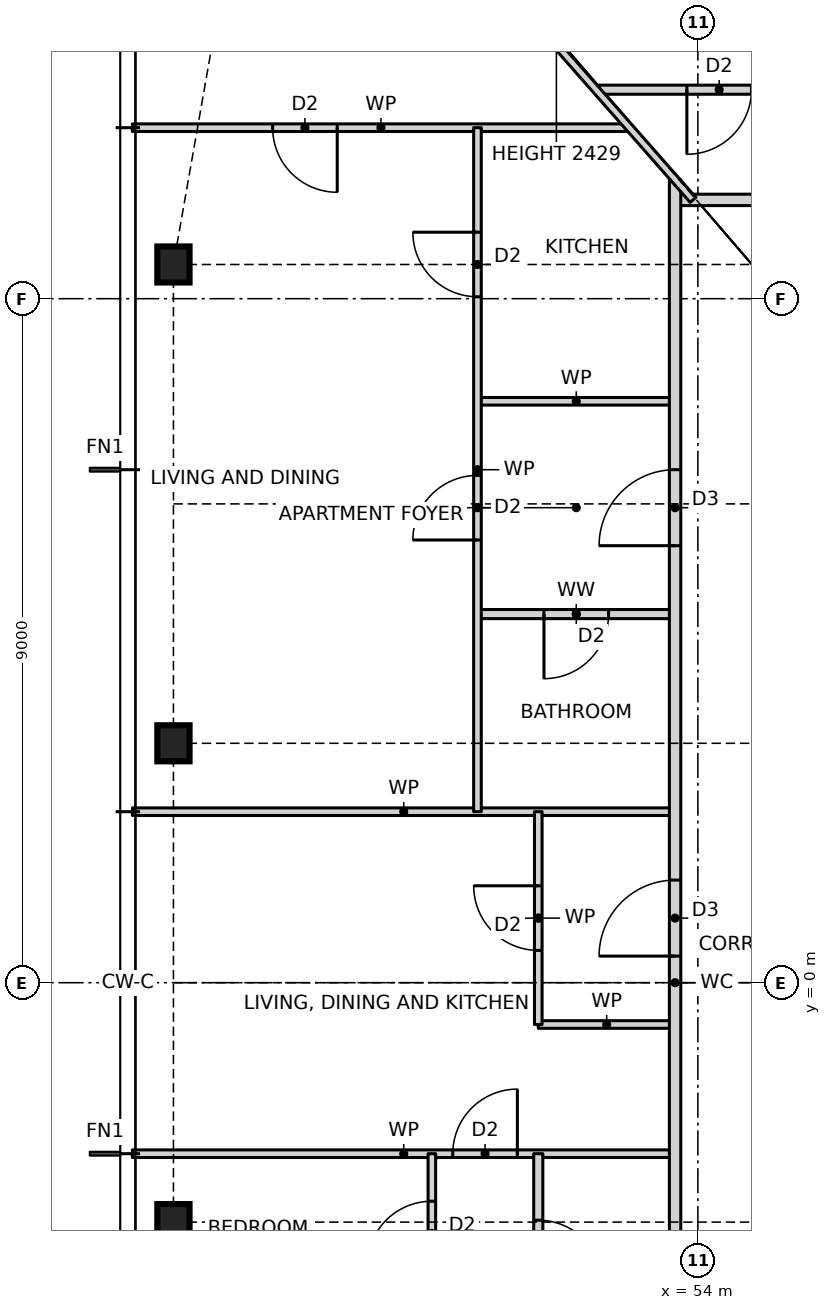
"""IFC4 building model, lengths in metres.
Left out: names, types, materials, properties, quantities, classifications, styles, units other than length and angle.
Written with IfcOpenShell. Run it as: python <this file> out.ifc"""

import sys

from ifc_helpers import new_model, si_unit, direction, frame, frame_2d, origin, origin_2d, place, context, subcontext, project, spatial, rectangle, i_section, extrude, element, fill, save


model = new_model("IFC4")
c1 = context("Model", 3, precision=1e-05, world=origin(), true_north=direction((0.0, 1.0)))
c2 = subcontext(c1, "Body", "Model", "MODEL_VIEW")
j1 = project(units=[si_unit("LENGTHUNIT", "METRE"), si_unit("PLANEANGLEUNIT", "RADIAN")], contexts=[c1])
p1 = place(None, origin())
s1 = spatial("IfcSite", under=j1, at=p1, CompositionType="ELEMENT")
p2 = place(p1, origin())
s2 = spatial("IfcBuilding", under=s1, at=p2, CompositionType="ELEMENT")
p3 = place(p2, frame((0.0, 0.0, 67.5)))
s3 = spatial("IfcBuildingStorey", under=s2, at=p3, CompositionType="ELEMENT", Elevation=67.5)
for number, where, z_axis, x_axis in (
    (1, (47.1, 9.45, 0.0), (0.0, 0.0, 1.0), (1.0, 0.0, 0.0)),
    (2, (47.1, 3.15, 0.0), (0.0, 0.0, 1.0), (1.0, 0.0, 0.0)),
    (3, (47.1, -3.15, 0.0), (0.0, 0.0, 1.0), (1.0, 0.0, 0.0)),
):
    element("IfcColumn", number, at=place(p3, frame(where, z_axis=z_axis, x_axis=x_axis)), inside=s3, PredefinedType="COLUMN", context=c2, shape_type="SweptSolid", body=[
        extrude(i_section(OverallWidth=0.424, OverallDepth=0.475, WebThickness=0.048, FlangeThickness=0.077, at=origin_2d()), origin(), (0.0, 0.0, 1.0), 3.5),
    ])
p4 = place(p3, frame((46.56, -2.25, 0.0), z_axis=(0.0, 0.0, 1.0), x_axis=(1.0, 0.0, 0.0)))
e4 = element("IfcWall", 4, at=p4, inside=s3, PredefinedType="PARTITIONING", context=c2, shape_type="SweptSolid", body=[
    extrude(rectangle(XDim=7.14, YDim=0.1, at=frame_2d((3.57, 0.0))), origin(), (0.0, 0.0, 1.0), 3.27),
])
p5 = place(p4, frame((4.215, 0.0, 0.0)))
e5 = element("IfcOpeningElement", 5, at=p5, cuts=e4, PredefinedType="OPENING", context=c2, shape_type="SweptSolid", body=[
    extrude(rectangle(XDim=0.85, YDim=2.1, at=frame_2d((0.425, 1.05))), frame((0.0, 0.06, 0.0), z_axis=(0.0, -1.0, 0.0), x_axis=(1.0, 0.0, 0.0)), (0.0, 0.0, 1.0), 0.12),
])
p6 = place(p3, frame((51.9, -0.55, 0.0), z_axis=(0.0, 0.0, 1.0), x_axis=(1.0, 0.0, 0.0)))
e6 = element("IfcWall", 6, at=p6, inside=s3, PredefinedType="PARTITIONING", context=c2, shape_type="SweptSolid", body=[
    extrude(rectangle(XDim=1.8, YDim=0.1, at=frame_2d((0.9, 0.0))), origin(), (0.0, 0.0, 1.0), 3.27),
])
p7 = place(p3, frame((46.56, 2.25, 0.0), z_axis=(0.0, 0.0, 1.0), x_axis=(1.0, 0.0, 0.0)))
e7 = element("IfcWall", 7, at=p7, inside=s3, PredefinedType="PARTITIONING", context=c2, shape_type="SweptSolid", body=[
    extrude(rectangle(XDim=7.14, YDim=0.1, at=frame_2d((3.57, 0.0))), origin(), (0.0, 0.0, 1.0), 3.27),
])
p8 = place(p3, frame((51.1, 4.85, 0.0), z_axis=(0.0, 0.0, 1.0), x_axis=(1.0, 0.0, 0.0)))
e8 = element("IfcWall", 8, at=p8, inside=s3, PredefinedType="PARTITIONING", context=c2, shape_type="SweptSolid", body=[
    extrude(rectangle(XDim=2.6, YDim=0.12, at=frame_2d((1.3, 0.0))), origin(), (0.0, 0.0, 1.0), 3.27),
])
p9 = place(p8, frame((0.875, 0.0, 0.0)))
e9 = element("IfcOpeningElement", 9, at=p9, cuts=e8, PredefinedType="OPENING", context=c2, shape_type="SweptSolid", body=[
    extrude(rectangle(XDim=0.85, YDim=2.1, at=frame_2d((0.425, 1.05))), frame((0.0, 0.07, 0.0), z_axis=(0.0, -1.0, 0.0), x_axis=(1.0, 0.0, 0.0)), (0.0, 0.0, 1.0), 0.14),
])
p10 = place(p3, frame((51.1, 7.65, 0.0), z_axis=(0.0, 0.0, 1.0), x_axis=(1.0, 0.0, 0.0)))
e10 = element("IfcWall", 10, at=p10, inside=s3, PredefinedType="PARTITIONING", context=c2, shape_type="SweptSolid", body=[
    extrude(rectangle(XDim=2.6, YDim=0.1, at=frame_2d((1.3, 0.0))), origin(), (0.0, 0.0, 1.0), 3.27),
])
p11 = place(p3, frame((53.7, 10.3, 0.0), z_axis=(0.0, 0.0, 1.0), x_axis=(1.0, 0.0, 0.0)))
e11 = element("IfcWall", 11, at=p11, inside=s3, PredefinedType="PARTITIONING", context=c2, shape_type="SweptSolid", body=[
    extrude(rectangle(XDim=18.6, YDim=0.15, at=frame_2d((9.3, 0.0))), origin(), (0.0, 0.0, 1.0), 3.27),
])
p12 = place(p11, frame((12.8, 0.0, 0.0)))
e12 = element("IfcOpeningElement", 12, at=p12, cuts=e11, PredefinedType="OPENING", context=c2, shape_type="SweptSolid", body=[
    extrude(rectangle(XDim=1.0, YDim=2.1, at=frame_2d((0.5, 1.05))), frame((0.0, 0.085, 0.0), z_axis=(0.0, -1.0, 0.0), x_axis=(1.0, 0.0, 0.0)), (0.0, 0.0, 1.0), 0.17),
])
p13 = place(p11, frame((7.4, 0.0, 0.0)))
e13 = element("IfcOpeningElement", 13, at=p13, cuts=e11, PredefinedType="OPENING", context=c2, shape_type="SweptSolid", body=[
    extrude(rectangle(XDim=1.0, YDim=2.1, at=frame_2d((0.5, 1.05))), frame((0.0, 0.085, 0.0), z_axis=(0.0, -1.0, 0.0), x_axis=(1.0, 0.0, 0.0)), (0.0, 0.0, 1.0), 0.17),
])
p14 = place(p3, frame((46.56, 11.25, 0.0), z_axis=(0.0, 0.0, 1.0), x_axis=(1.0, 0.0, 0.0)))
e14 = element("IfcWall", 14, at=p14, inside=s3, PredefinedType="PARTITIONING", context=c2, shape_type="SweptSolid", body=[
    extrude(rectangle(XDim=6.54, YDim=0.1, at=frame_2d((3.27, 0.0))), origin(), (0.0, 0.0, 1.0), 3.27),
])
p15 = place(p14, frame((1.845, 0.0, 0.0)))
e15 = element("IfcOpeningElement", 15, at=p15, cuts=e14, PredefinedType="OPENING", context=c2, shape_type="SweptSolid", body=[
    extrude(rectangle(XDim=0.85, YDim=2.1, at=frame_2d((0.425, 1.05))), frame((0.0, 0.06, 0.0), z_axis=(0.0, -1.0, 0.0), x_axis=(1.0, 0.0, 0.0)), (0.0, 0.0, 1.0), 0.12),
])
p16 = place(p3, frame((52.66, 11.75, 0.0), z_axis=(0.0, 0.0, 1.0), x_axis=(1.0, 0.0, 0.0)))
e16 = element("IfcWall", 16, at=p16, inside=s3, PredefinedType="PARTITIONING", context=c2, shape_type="SweptSolid", body=[
    extrude(rectangle(XDim=5.84, YDim=0.12, at=frame_2d((2.92, 0.0))), origin(), (0.0, 0.0, 1.0), 3.27),
])
p17 = place(p16, frame((4.115, 0.0, 0.0)))
e17 = element("IfcOpeningElement", 17, at=p17, cuts=e16, PredefinedType="OPENING", context=c2, shape_type="SweptSolid", body=[
    extrude(rectangle(XDim=0.85, YDim=2.1, at=frame_2d((0.425, 1.05))), frame((0.0, 0.07, 0.0), z_axis=(0.0, -1.0, 0.0), x_axis=(1.0, 0.0, 0.0)), (0.0, 0.0, 1.0), 0.14),
])
p18 = place(p16, frame((1.195, 0.0, 0.0)))
e18 = element("IfcOpeningElement", 18, at=p18, cuts=e16, PredefinedType="OPENING", context=c2, shape_type="SweptSolid", body=[
    extrude(rectangle(XDim=0.85, YDim=2.1, at=frame_2d((0.425, 1.05))), frame((0.0, 0.07, 0.0), z_axis=(0.0, -1.0, 0.0), x_axis=(1.0, 0.0, 0.0)), (0.0, 0.0, 1.0), 0.14),
])
p19 = place(p3, frame((53.7, -10.568, 0.0), z_axis=(0.0, 0.0, 1.0), x_axis=(0.0, 1.0, 0.0)))
e19 = element("IfcWall", 19, at=p19, inside=s3, PredefinedType="PARTITIONING", context=c2, shape_type="SweptSolid", body=[
    extrude(rectangle(XDim=21.136, YDim=0.15, at=frame_2d((10.568, 0.0))), origin(), (0.0, 0.0, 1.0), 3.27),
])
p20 = place(p19, frame((16.318, 0.0, 0.0)))
e20 = element("IfcOpeningElement", 20, at=p20, cuts=e19, PredefinedType="OPENING", context=c2, shape_type="SweptSolid", body=[
    extrude(rectangle(XDim=1.0, YDim=2.1, at=frame_2d((0.5, 1.05))), frame((0.0, 0.085, 0.0), z_axis=(0.0, -1.0, 0.0), x_axis=(1.0, 0.0, 0.0)), (0.0, 0.0, 1.0), 0.17),
])
p21 = place(p19, frame((10.918, 0.0, 0.0)))
e21 = element("IfcOpeningElement", 21, at=p21, cuts=e19, PredefinedType="OPENING", context=c2, shape_type="SweptSolid", body=[
    extrude(rectangle(XDim=1.0, YDim=2.1, at=frame_2d((0.5, 1.05))), frame((0.0, 0.085, 0.0), z_axis=(0.0, -1.0, 0.0), x_axis=(1.0, 0.0, 0.0)), (0.0, 0.0, 1.0), 0.17),
])
p22 = place(p3, frame((51.9, -12.614, 0.0), z_axis=(0.0, 0.0, 1.0), x_axis=(0.0, 1.0, 0.0)))
e22 = element("IfcWall", 22, at=p22, inside=s3, PredefinedType="PARTITIONING", context=c2, shape_type="SweptSolid", body=[
    extrude(rectangle(XDim=10.364, YDim=0.12, at=frame_2d((5.182, 0.0))), origin(), (0.0, 0.0, 1.0), 3.27),
])
p23 = place(p22, frame((8.639, 0.0, 0.0)))
e23 = element("IfcOpeningElement", 23, at=p23, cuts=e22, PredefinedType="OPENING", context=c2, shape_type="SweptSolid", body=[
    extrude(rectangle(XDim=0.85, YDim=2.1, at=frame_2d((0.425, 1.05))), frame((0.0, 0.07, 0.0), z_axis=(0.0, -1.0, 0.0), x_axis=(1.0, 0.0, 0.0)), (0.0, 0.0, 1.0), 0.14),
])
p24 = place(p22, frame((5.139, 0.0, 0.0)))
e24 = element("IfcOpeningElement", 24, at=p24, cuts=e22, PredefinedType="OPENING", context=c2, shape_type="SweptSolid", body=[
    extrude(rectangle(XDim=0.85, YDim=2.1, at=frame_2d((0.425, 1.05))), frame((0.0, 0.07, 0.0), z_axis=(0.0, -1.0, 0.0), x_axis=(1.0, 0.0, 0.0)), (0.0, 0.0, 1.0), 0.14),
])
p25 = place(p22, frame((1.257, 0.0, 0.0)))
e25 = element("IfcOpeningElement", 25, at=p25, cuts=e22, PredefinedType="OPENING", context=c2, shape_type="SweptSolid", body=[
    extrude(rectangle(XDim=0.85, YDim=2.1, at=frame_2d((0.425, 1.05))), frame((0.0, 0.07, 0.0), z_axis=(0.0, -1.0, 0.0), x_axis=(1.0, 0.0, 0.0)), (0.0, 0.0, 1.0), 0.14),
])
p26 = place(p3, frame((51.9, -0.55, 0.0), z_axis=(0.0, 0.0, 1.0), x_axis=(0.0, 1.0, 0.0)))
e26 = element("IfcWall", 26, at=p26, inside=s3, PredefinedType="PARTITIONING", context=c2, shape_type="SweptSolid", body=[
    extrude(rectangle(XDim=2.8, YDim=0.1, at=frame_2d((1.4, 0.0))), origin(), (0.0, 0.0, 1.0), 3.27),
])
p27 = place(p26, frame((0.975, 0.0, 0.0)))
e27 = element("IfcOpeningElement", 27, at=p27, cuts=e26, PredefinedType="OPENING", context=c2, shape_type="SweptSolid", body=[
    extrude(rectangle(XDim=0.85, YDim=2.1, at=frame_2d((0.425, 1.05))), frame((0.0, 0.06, 0.0), z_axis=(0.0, -1.0, 0.0), x_axis=(1.0, 0.0, 0.0)), (0.0, 0.0, 1.0), 0.12),
])
p28 = place(p3, frame((51.1, 2.25, 0.0), z_axis=(0.0, 0.0, 1.0), x_axis=(0.0, 1.0, 0.0)))
e28 = element("IfcWall", 28, at=p28, inside=s3, PredefinedType="PARTITIONING", context=c2, shape_type="SweptSolid", body=[
    extrude(rectangle(XDim=9.0, YDim=0.1, at=frame_2d((4.5, 0.0))), origin(), (0.0, 0.0, 1.0), 3.27),
])
p29 = place(p28, frame((6.775, 0.0, 0.0)))
e29 = element("IfcOpeningElement", 29, at=p29, cuts=e28, PredefinedType="OPENING", context=c2, shape_type="SweptSolid", body=[
    extrude(rectangle(XDim=0.85, YDim=2.1, at=frame_2d((0.425, 1.05))), frame((0.0, 0.06, 0.0), z_axis=(0.0, -1.0, 0.0), x_axis=(1.0, 0.0, 0.0)), (0.0, 0.0, 1.0), 0.12),
])
p30 = place(p28, frame((3.575, 0.0, 0.0)))
e30 = element("IfcOpeningElement", 30, at=p30, cuts=e28, PredefinedType="OPENING", context=c2, shape_type="SweptSolid", body=[
    extrude(rectangle(XDim=0.85, YDim=2.1, at=frame_2d((0.425, 1.05))), frame((0.0, 0.06, 0.0), z_axis=(0.0, -1.0, 0.0), x_axis=(1.0, 0.0, 0.0)), (0.0, 0.0, 1.0), 0.12),
])
p31 = place(p3, frame((50.5, -13.45, 0.0), z_axis=(0.0, 0.0, 1.0), x_axis=(0.0, 1.0, 0.0)))
e31 = element("IfcWall", 31, at=p31, inside=s3, PredefinedType="PARTITIONING", context=c2, shape_type="SweptSolid", body=[
    extrude(rectangle(XDim=11.2, YDim=0.1, at=frame_2d((5.6, 0.0))), origin(), (0.0, 0.0, 1.0), 3.27),
])
p32 = place(p31, frame((9.725, 0.0, 0.0)))
e32 = element("IfcOpeningElement", 32, at=p32, cuts=e31, PredefinedType="OPENING", context=c2, shape_type="SweptSolid", body=[
    extrude(rectangle(XDim=0.85, YDim=2.1, at=frame_2d((0.425, 1.05))), frame((0.0, 0.06, 0.0), z_axis=(0.0, -1.0, 0.0), x_axis=(1.0, 0.0, 0.0)), (0.0, 0.0, 1.0), 0.12),
])
p33 = place(p31, frame((4.025, 0.0, 0.0)))
e33 = element("IfcOpeningElement", 33, at=p33, cuts=e31, PredefinedType="OPENING", context=c2, shape_type="SweptSolid", body=[
    extrude(rectangle(XDim=0.85, YDim=2.1, at=frame_2d((0.425, 1.05))), frame((0.0, 0.06, 0.0), z_axis=(0.0, -1.0, 0.0), x_axis=(1.0, 0.0, 0.0)), (0.0, 0.0, 1.0), 0.12),
])
p34 = place(p31, frame((0.675, 0.0, 0.0)))
e34 = element("IfcOpeningElement", 34, at=p34, cuts=e31, PredefinedType="OPENING", context=c2, shape_type="SweptSolid", body=[
    extrude(rectangle(XDim=0.85, YDim=2.1, at=frame_2d((0.425, 1.05))), frame((0.0, 0.06, 0.0), z_axis=(0.0, -1.0, 0.0), x_axis=(1.0, 0.0, 0.0)), (0.0, 0.0, 1.0), 0.12),
])
p35 = place(p3, frame((53.936, 10.3, 0.0), z_axis=(0.0, 0.0, 1.0), x_axis=(-0.660638210404, 0.750704439146, 0.0)))
e35 = element("IfcWall", 35, at=p35, inside=s3, PredefinedType="PARTITIONING", context=c2, shape_type="SweptSolid", body=[
    extrude(rectangle(XDim=9.07, YDim=0.1, at=frame_2d((4.535, 0.0))), origin(), (0.0, 0.0, 1.0), 2.429),
])
p36 = place(p18, frame((0.85, 0.0, 0.0), z_axis=(0.0, 0.0, 1.0), x_axis=(-1.0, 0.0, 0.0)))
e36 = element("IfcDoor", 36, at=p36, inside=s3, OperationType="SINGLE_SWING_RIGHT", PredefinedType="DOOR", context=c2, shape_type="SweptSolid", body=[
    extrude(rectangle(XDim=0.85, YDim=2.1, at=frame_2d((0.425, 1.05))), frame((0.0, 0.025, 0.0), z_axis=(0.0, -1.0, 0.0), x_axis=(1.0, 0.0, 0.0)), (0.0, 0.0, 1.0), 0.05),
])
fill(e18, e36)
p37 = place(p29, origin())
e37 = element("IfcDoor", 37, at=p37, inside=s3, OperationType="SINGLE_SWING_RIGHT", PredefinedType="DOOR", context=c2, shape_type="SweptSolid", body=[
    extrude(rectangle(XDim=0.85, YDim=2.1, at=frame_2d((0.425, 1.05))), frame((0.0, 0.025, 0.0), z_axis=(0.0, -1.0, 0.0), x_axis=(1.0, 0.0, 0.0)), (0.0, 0.0, 1.0), 0.05),
])
fill(e29, e37)
p38 = place(p20, origin())
e38 = element("IfcDoor", 38, at=p38, inside=s3, OperationType="SINGLE_SWING_LEFT", PredefinedType="DOOR", context=c2, shape_type="SweptSolid", body=[
    extrude(rectangle(XDim=1.0, YDim=2.1, at=frame_2d((0.5, 1.05))), frame((0.0, 0.025, 0.0), z_axis=(0.0, -1.0, 0.0), x_axis=(1.0, 0.0, 0.0)), (0.0, 0.0, 1.0), 0.05),
])
fill(e20, e38)
p39 = place(p30, origin())
e39 = element("IfcDoor", 39, at=p39, inside=s3, OperationType="SINGLE_SWING_LEFT", PredefinedType="DOOR", context=c2, shape_type="SweptSolid", body=[
    extrude(rectangle(XDim=0.85, YDim=2.1, at=frame_2d((0.425, 1.05))), frame((0.0, 0.025, 0.0), z_axis=(0.0, -1.0, 0.0), x_axis=(1.0, 0.0, 0.0)), (0.0, 0.0, 1.0), 0.05),
])
fill(e30, e39)
p40 = place(p9, frame((0.85, 0.0, 0.0), z_axis=(0.0, 0.0, 1.0), x_axis=(-1.0, 0.0, 0.0)))
e40 = element("IfcDoor", 40, at=p40, inside=s3, OperationType="SINGLE_SWING_RIGHT", PredefinedType="DOOR", context=c2, shape_type="SweptSolid", body=[
    extrude(rectangle(XDim=0.85, YDim=2.1, at=frame_2d((0.425, 1.05))), frame((0.0, 0.025, 0.0), z_axis=(0.0, -1.0, 0.0), x_axis=(1.0, 0.0, 0.0)), (0.0, 0.0, 1.0), 0.05),
])
fill(e9, e40)
p41 = place(p15, frame((0.85, 0.0, 0.0), z_axis=(0.0, 0.0, 1.0), x_axis=(-1.0, 0.0, 0.0)))
e41 = element("IfcDoor", 41, at=p41, inside=s3, OperationType="SINGLE_SWING_LEFT", PredefinedType="DOOR", context=c2, shape_type="SweptSolid", body=[
    extrude(rectangle(XDim=0.85, YDim=2.1, at=frame_2d((0.425, 1.05))), frame((0.0, 0.025, 0.0), z_axis=(0.0, -1.0, 0.0), x_axis=(1.0, 0.0, 0.0)), (0.0, 0.0, 1.0), 0.05),
])
fill(e15, e41)
p42 = place(p21, origin())
e42 = element("IfcDoor", 42, at=p42, inside=s3, OperationType="SINGLE_SWING_LEFT", PredefinedType="DOOR", context=c2, shape_type="SweptSolid", body=[
    extrude(rectangle(XDim=1.0, YDim=2.1, at=frame_2d((0.5, 1.05))), frame((0.0, 0.025, 0.0), z_axis=(0.0, -1.0, 0.0), x_axis=(1.0, 0.0, 0.0)), (0.0, 0.0, 1.0), 0.05),
])
fill(e21, e42)
p43 = place(p27, origin())
e43 = element("IfcDoor", 43, at=p43, inside=s3, OperationType="SINGLE_SWING_RIGHT", PredefinedType="DOOR", context=c2, shape_type="SweptSolid", body=[
    extrude(rectangle(XDim=0.85, YDim=2.1, at=frame_2d((0.425, 1.05))), frame((0.0, 0.025, 0.0), z_axis=(0.0, -1.0, 0.0), x_axis=(1.0, 0.0, 0.0)), (0.0, 0.0, 1.0), 0.05),
])
fill(e27, e43)
p44 = place(p5, origin())
e44 = element("IfcDoor", 44, at=p44, inside=s3, OperationType="SINGLE_SWING_RIGHT", PredefinedType="DOOR", context=c2, shape_type="SweptSolid", body=[
    extrude(rectangle(XDim=0.85, YDim=2.1, at=frame_2d((0.425, 1.05))), frame((0.0, 0.025, 0.0), z_axis=(0.0, -1.0, 0.0), x_axis=(1.0, 0.0, 0.0)), (0.0, 0.0, 1.0), 0.05),
])
fill(e5, e44)
p45 = place(p32, origin())
e45 = element("IfcDoor", 45, at=p45, inside=s3, OperationType="SINGLE_SWING_LEFT", PredefinedType="DOOR", context=c2, shape_type="SweptSolid", body=[
    extrude(rectangle(XDim=0.85, YDim=2.1, at=frame_2d((0.425, 1.05))), frame((0.0, 0.025, 0.0), z_axis=(0.0, -1.0, 0.0), x_axis=(1.0, 0.0, 0.0)), (0.0, 0.0, 1.0), 0.05),
])
fill(e32, e45)
p46 = place(p23, frame((0.85, 0.0, 0.0), z_axis=(0.0, 0.0, 1.0), x_axis=(-1.0, 0.0, 0.0)))
e46 = element("IfcDoor", 46, at=p46, inside=s3, OperationType="SINGLE_SWING_RIGHT", PredefinedType="DOOR", context=c2, shape_type="SweptSolid", body=[
    extrude(rectangle(XDim=0.85, YDim=2.1, at=frame_2d((0.425, 1.05))), frame((0.0, 0.025, 0.0), z_axis=(0.0, -1.0, 0.0), x_axis=(1.0, 0.0, 0.0)), (0.0, 0.0, 1.0), 0.05),
])
fill(e23, e46)
save(model, sys.argv[1])
